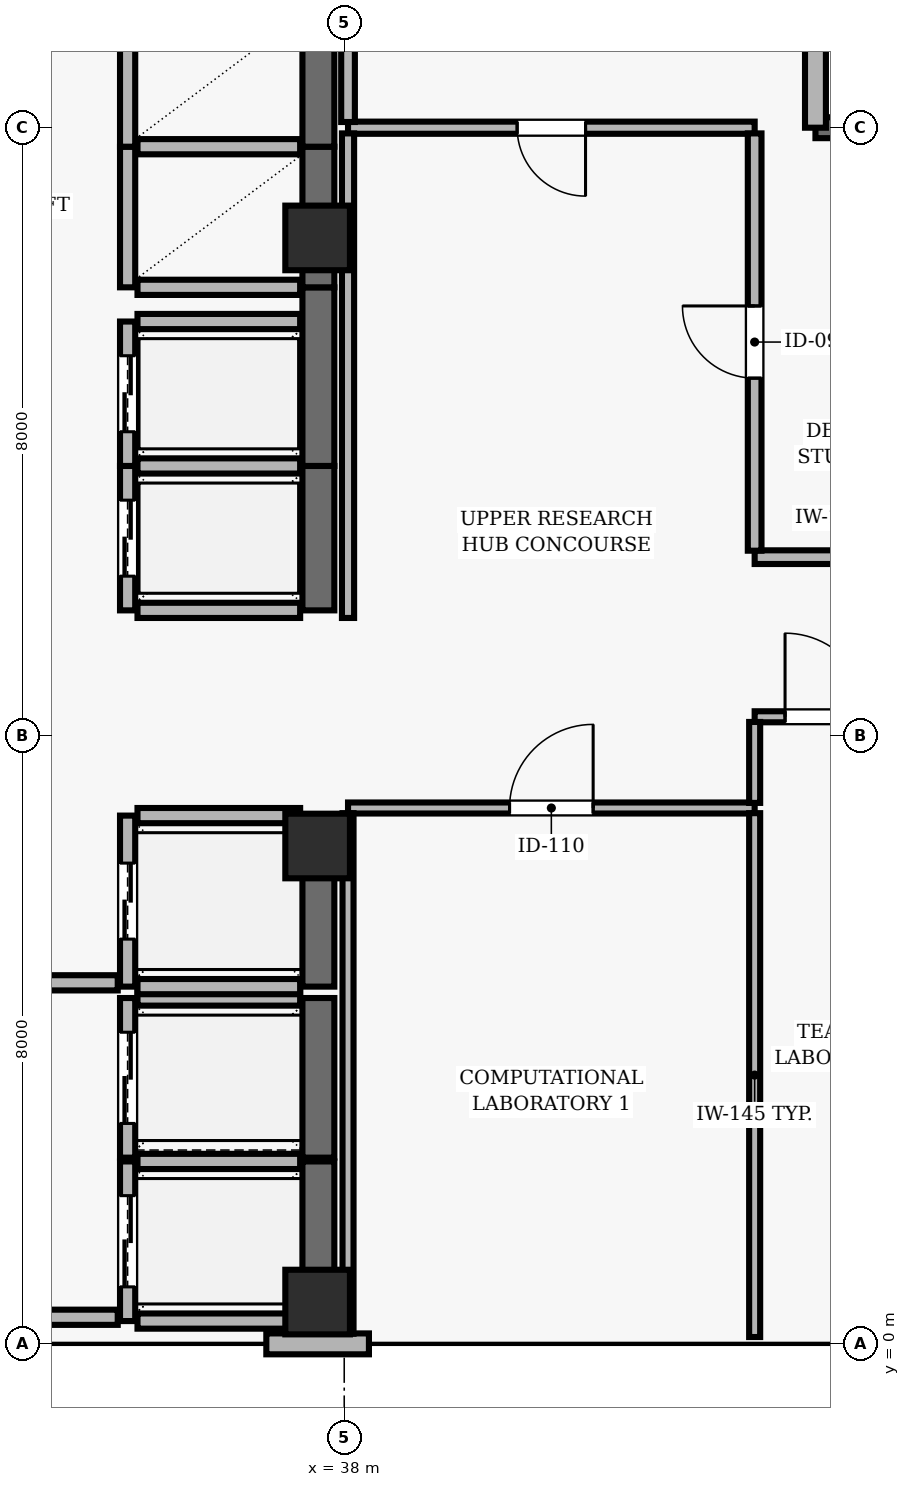
"""IFC4 building model, lengths in metres.
Left out: names, types, materials, properties, quantities, classifications, styles, units other than length and angle.
Written with IfcOpenShell. Run it as: python <this file> out.ifc"""

import sys

from ifc_helpers import new_model, si_unit, direction, frame, frame_2d, origin, origin_2d, place, context, subcontext, project, spatial, rectangle, extrude, element, fill, save


model = new_model("IFC4")
c1 = context("Model", 3, precision=1e-05, world=origin(), true_north=direction((0.0, 1.0)))
c2 = subcontext(c1, "Body", "Model", "MODEL_VIEW")
j1 = project(units=[si_unit("LENGTHUNIT", "METRE"), si_unit("PLANEANGLEUNIT", "RADIAN")], contexts=[c1])
p1 = place(None, origin())
s1 = spatial("IfcSite", under=j1, at=p1, CompositionType="ELEMENT")
p2 = place(p1, origin())
s2 = spatial("IfcBuilding", under=s1, at=p2, CompositionType="ELEMENT")
p3 = place(p2, frame((0.0, 0.0, 279.4)))
s3 = spatial("IfcBuildingStorey", under=s2, at=p3, CompositionType="ELEMENT", Elevation=279.4)
for number, where, z_axis, x_axis in (
    (1, (37.65, 0.55, 0.0), (0.0, 0.0, 1.0), (1.0, 0.0, 0.0)),
    (2, (37.65, 6.55, 0.0), (0.0, 0.0, 1.0), (1.0, 0.0, 0.0)),
    (3, (37.65, 14.55, 0.0), (0.0, 0.0, 1.0), (1.0, 0.0, 0.0)),
):
    element("IfcColumn", number, at=place(p3, frame(where, z_axis=z_axis, x_axis=x_axis)), inside=s3, PredefinedType="COLUMN", context=c2, shape_type="SweptSolid", body=[
        extrude(rectangle(XDim=0.85, YDim=0.85, at=origin_2d()), origin(), (0.0, 0.0, 1.0), 3.9),
    ])
p4 = place(p3, frame((36.975, 0.0, 0.0), z_axis=(0.0, 0.0, 1.0), x_axis=(1.0, 0.0, 0.0)))
e4 = element("IfcWall", 4, at=p4, inside=s3, PredefinedType="SOLIDWALL", context=c2, shape_type="SweptSolid", body=[
    extrude(rectangle(XDim=1.35, YDim=0.275, at=frame_2d((0.675, 0.0))), origin(), (0.0, 0.0, 1.0), 3.69),
])
p5 = place(p3, frame((57.3, 16.0, 0.0), z_axis=(0.0, 0.0, 1.0), x_axis=(-1.0, 0.0, 0.0)))
e5 = element("IfcWall", 5, at=p5, inside=s3, PredefinedType="SOLIDWALL", context=c2, shape_type="SweptSolid", body=[
    extrude(rectangle(XDim=13.1, YDim=0.275, at=frame_2d((6.55, 0.0))), origin(), (0.0, 0.0, 1.0), 3.69),
])
p6 = place(p5, frame((8.15, 0.0, 0.0)))
e6 = element("IfcOpeningElement", 6, at=p6, cuts=e5, PredefinedType="OPENING", context=c2, shape_type="SweptSolid", body=[
    extrude(rectangle(XDim=1.0, YDim=2.2, at=frame_2d((0.5, 1.1))), frame((0.0, 0.147, 0.0), z_axis=(0.0, -1.0, 0.0), x_axis=(1.0, 0.0, 0.0)), (0.0, 0.0, 1.0), 0.295),
])
p7 = place(p5, frame((1.775, 0.0, 0.9)))
e7 = element("IfcOpeningElement", 7, at=p7, cuts=e5, PredefinedType="OPENING", context=c2, shape_type="SweptSolid", body=[
    extrude(rectangle(XDim=1.2, YDim=1.6, at=frame_2d((0.6, 0.8))), frame((0.0, 0.147, 0.0), z_axis=(0.0, -1.0, 0.0), x_axis=(1.0, 0.0, 0.0)), (0.0, 0.0, 1.0), 0.295),
])
p8 = place(p3, frame((44.2, 16.0, 0.0), z_axis=(0.0, 0.0, 1.0), x_axis=(0.0, 1.0, 0.0)))
e8 = element("IfcWall", 8, at=p8, inside=s3, PredefinedType="SOLIDWALL", context=c2, shape_type="SweptSolid", body=[
    extrude(rectangle(XDim=4.4, YDim=0.275, at=frame_2d((2.2, 0.0))), origin(), (0.0, 0.0, 1.0), 3.69),
])
p9 = place(p3, frame((35.15, 2.4, 0.0), z_axis=(0.0, 0.0, 1.0), x_axis=(0.0, -1.0, 0.0)))
e9 = element("IfcWall", 9, at=p9, inside=s3, PredefinedType="SOLIDWALL", context=c2, shape_type="SweptSolid", body=[
    extrude(rectangle(XDim=2.1, YDim=0.2, at=frame_2d((1.05, 0.0))), origin(), (0.0, 0.0, 1.0), 3.69),
])
p10 = place(p9, frame((0.45, 0.0, 0.0)))
e10 = element("IfcOpeningElement", 10, at=p10, cuts=e9, PredefinedType="OPENING", context=c2, shape_type="SweptSolid", body=[
    extrude(rectangle(XDim=1.2, YDim=2.15, at=frame_2d((0.6, 1.075))), frame((0.0, 0.11, 0.0), z_axis=(0.0, -1.0, 0.0), x_axis=(1.0, 0.0, 0.0)), (0.0, 0.0, 1.0), 0.22),
])
p11 = place(p3, frame((37.66, 0.3, 0.0), z_axis=(0.0, 0.0, 1.0), x_axis=(0.0, 1.0, 0.0)))
e11 = element("IfcWall", 11, at=p11, inside=s3, PredefinedType="SHEAR", context=c2, shape_type="SweptSolid", body=[
    extrude(rectangle(XDim=2.1, YDim=0.42, at=frame_2d((1.05, 0.0))), origin(), (0.0, 0.0, 1.0), 3.69),
])
for number, where, z_axis, x_axis in (
    (12, (35.28, 0.3, 0.0), (0.0, 0.0, 1.0), (1.0, 0.0, 0.0)),
    (13, (37.42, 2.4, 0.0), (0.0, 0.0, 1.0), (-1.0, 0.0, 0.0)),
):
    element("IfcWall", number, at=place(p3, frame(where, z_axis=z_axis, x_axis=x_axis)), inside=s3, PredefinedType="SOLIDWALL", context=c2, shape_type="SweptSolid", body=[
        extrude(rectangle(XDim=2.14, YDim=0.2, at=frame_2d((1.07, 0.0))), origin(), (0.0, 0.0, 1.0), 3.69),
    ])
p12 = place(p3, frame((35.15, 4.55, 0.0), z_axis=(0.0, 0.0, 1.0), x_axis=(0.0, -1.0, 0.0)))
e14 = element("IfcWall", 14, at=p12, inside=s3, PredefinedType="SOLIDWALL", context=c2, shape_type="SweptSolid", body=[
    extrude(rectangle(XDim=2.1, YDim=0.2, at=frame_2d((1.05, 0.0))), origin(), (0.0, 0.0, 1.0), 3.69),
])
p13 = place(p12, frame((0.45, 0.0, 0.0)))
e15 = element("IfcOpeningElement", 15, at=p13, cuts=e14, PredefinedType="OPENING", context=c2, shape_type="SweptSolid", body=[
    extrude(rectangle(XDim=1.2, YDim=2.15, at=frame_2d((0.6, 1.075))), frame((0.0, 0.11, 0.0), z_axis=(0.0, -1.0, 0.0), x_axis=(1.0, 0.0, 0.0)), (0.0, 0.0, 1.0), 0.22),
])
p14 = place(p3, frame((37.66, 2.45, 0.0), z_axis=(0.0, 0.0, 1.0), x_axis=(0.0, 1.0, 0.0)))
e16 = element("IfcWall", 16, at=p14, inside=s3, PredefinedType="SHEAR", context=c2, shape_type="SweptSolid", body=[
    extrude(rectangle(XDim=2.1, YDim=0.42, at=frame_2d((1.05, 0.0))), origin(), (0.0, 0.0, 1.0), 3.69),
])
p15 = place(p3, frame((37.42, 4.55, 0.0), z_axis=(0.0, 0.0, 1.0), x_axis=(-1.0, 0.0, 0.0)))
e17 = element("IfcWall", 17, at=p15, inside=s3, PredefinedType="SOLIDWALL", context=c2, shape_type="SweptSolid", body=[
    extrude(rectangle(XDim=2.14, YDim=0.2, at=frame_2d((1.07, 0.0))), origin(), (0.0, 0.0, 1.0), 3.69),
])
p16 = place(p3, frame((35.15, 6.95, 0.0), z_axis=(0.0, 0.0, 1.0), x_axis=(0.0, -1.0, 0.0)))
e18 = element("IfcWall", 18, at=p16, inside=s3, PredefinedType="SOLIDWALL", context=c2, shape_type="SweptSolid", body=[
    extrude(rectangle(XDim=2.25, YDim=0.2, at=frame_2d((1.125, 0.0))), origin(), (0.0, 0.0, 1.0), 3.69),
])
p17 = place(p16, frame((0.625, 0.0, 0.0)))
e19 = element("IfcOpeningElement", 19, at=p17, cuts=e18, PredefinedType="OPENING", context=c2, shape_type="SweptSolid", body=[
    extrude(rectangle(XDim=1.0, YDim=2.1, at=frame_2d((0.5, 1.05))), frame((0.0, 0.11, 0.0), z_axis=(0.0, -1.0, 0.0), x_axis=(1.0, 0.0, 0.0)), (0.0, 0.0, 1.0), 0.22),
])
p18 = place(p3, frame((37.66, 4.7, 0.0), z_axis=(0.0, 0.0, 1.0), x_axis=(0.0, 1.0, 0.0)))
e20 = element("IfcWall", 20, at=p18, inside=s3, PredefinedType="SHEAR", context=c2, shape_type="SweptSolid", body=[
    extrude(rectangle(XDim=2.25, YDim=0.42, at=frame_2d((1.125, 0.0))), origin(), (0.0, 0.0, 1.0), 3.69),
])
for number, where, z_axis, x_axis in (
    (21, (35.28, 4.7, 0.0), (0.0, 0.0, 1.0), (1.0, 0.0, 0.0)),
    (22, (37.42, 6.95, 0.0), (0.0, 0.0, 1.0), (-1.0, 0.0, 0.0)),
):
    element("IfcWall", number, at=place(p3, frame(where, z_axis=z_axis, x_axis=x_axis)), inside=s3, PredefinedType="SOLIDWALL", context=c2, shape_type="SweptSolid", body=[
        extrude(rectangle(XDim=2.14, YDim=0.2, at=frame_2d((1.07, 0.0))), origin(), (0.0, 0.0, 1.0), 3.69),
    ])
p19 = place(p3, frame((35.15, 11.55, 0.0), z_axis=(0.0, 0.0, 1.0), x_axis=(0.0, -1.0, 0.0)))
e23 = element("IfcWall", 23, at=p19, inside=s3, PredefinedType="SOLIDWALL", context=c2, shape_type="SweptSolid", body=[
    extrude(rectangle(XDim=1.9, YDim=0.2, at=frame_2d((0.95, 0.0))), origin(), (0.0, 0.0, 1.0), 3.69),
])
p20 = place(p19, frame((0.45, 0.0, 0.0)))
e24 = element("IfcOpeningElement", 24, at=p20, cuts=e23, PredefinedType="OPENING", context=c2, shape_type="SweptSolid", body=[
    extrude(rectangle(XDim=1.0, YDim=2.1, at=frame_2d((0.5, 1.05))), frame((0.0, 0.11, 0.0), z_axis=(0.0, -1.0, 0.0), x_axis=(1.0, 0.0, 0.0)), (0.0, 0.0, 1.0), 0.22),
])
p21 = place(p3, frame((37.66, 9.65, 0.0), z_axis=(0.0, 0.0, 1.0), x_axis=(0.0, 1.0, 0.0)))
e25 = element("IfcWall", 25, at=p21, inside=s3, PredefinedType="SHEAR", context=c2, shape_type="SweptSolid", body=[
    extrude(rectangle(XDim=1.9, YDim=0.42, at=frame_2d((0.95, 0.0))), origin(), (0.0, 0.0, 1.0), 3.69),
])
for number, where, z_axis, x_axis in (
    (26, (35.28, 9.65, 0.0), (0.0, 0.0, 1.0), (1.0, 0.0, 0.0)),
    (27, (37.42, 11.55, 0.0), (0.0, 0.0, 1.0), (-1.0, 0.0, 0.0)),
):
    element("IfcWall", number, at=place(p3, frame(where, z_axis=z_axis, x_axis=x_axis)), inside=s3, PredefinedType="SOLIDWALL", context=c2, shape_type="SweptSolid", body=[
        extrude(rectangle(XDim=2.14, YDim=0.2, at=frame_2d((1.07, 0.0))), origin(), (0.0, 0.0, 1.0), 3.69),
    ])
p22 = place(p3, frame((35.15, 13.45, 0.0), z_axis=(0.0, 0.0, 1.0), x_axis=(0.0, -1.0, 0.0)))
e28 = element("IfcWall", 28, at=p22, inside=s3, PredefinedType="SOLIDWALL", context=c2, shape_type="SweptSolid", body=[
    extrude(rectangle(XDim=1.9, YDim=0.2, at=frame_2d((0.95, 0.0))), origin(), (0.0, 0.0, 1.0), 3.69),
])
p23 = place(p22, frame((0.45, 0.0, 0.0)))
e29 = element("IfcOpeningElement", 29, at=p23, cuts=e28, PredefinedType="OPENING", context=c2, shape_type="SweptSolid", body=[
    extrude(rectangle(XDim=1.0, YDim=2.1, at=frame_2d((0.5, 1.05))), frame((0.0, 0.11, 0.0), z_axis=(0.0, -1.0, 0.0), x_axis=(1.0, 0.0, 0.0)), (0.0, 0.0, 1.0), 0.22),
])
p24 = place(p3, frame((37.66, 11.55, 0.0), z_axis=(0.0, 0.0, 1.0), x_axis=(0.0, 1.0, 0.0)))
e30 = element("IfcWall", 30, at=p24, inside=s3, PredefinedType="SHEAR", context=c2, shape_type="SweptSolid", body=[
    extrude(rectangle(XDim=2.35, YDim=0.42, at=frame_2d((1.175, 0.0))), origin(), (0.0, 0.0, 1.0), 3.69),
])
p25 = place(p3, frame((37.42, 13.45, 0.0), z_axis=(0.0, 0.0, 1.0), x_axis=(-1.0, 0.0, 0.0)))
e31 = element("IfcWall", 31, at=p25, inside=s3, PredefinedType="SOLIDWALL", context=c2, shape_type="SweptSolid", body=[
    extrude(rectangle(XDim=2.14, YDim=0.2, at=frame_2d((1.07, 0.0))), origin(), (0.0, 0.0, 1.0), 3.69),
])
p26 = place(p3, frame((35.15, 15.75, 0.0), z_axis=(0.0, 0.0, 1.0), x_axis=(0.0, -1.0, 0.0)))
e32 = element("IfcWall", 32, at=p26, inside=s3, PredefinedType="SOLIDWALL", context=c2, shape_type="SweptSolid", body=[
    extrude(rectangle(XDim=1.85, YDim=0.2, at=frame_2d((0.925, 0.0))), origin(), (0.0, 0.0, 1.0), 3.69),
])
p27 = place(p3, frame((37.66, 13.9, 0.0), z_axis=(0.0, 0.0, 1.0), x_axis=(0.0, 1.0, 0.0)))
e33 = element("IfcWall", 33, at=p27, inside=s3, PredefinedType="SHEAR", context=c2, shape_type="SweptSolid", body=[
    extrude(rectangle(XDim=1.85, YDim=0.42, at=frame_2d((0.925, 0.0))), origin(), (0.0, 0.0, 1.0), 3.69),
])
for number, where, z_axis, x_axis in (
    (34, (35.28, 13.9, 0.0), (0.0, 0.0, 1.0), (1.0, 0.0, 0.0)),
    (35, (37.42, 15.75, 0.0), (0.0, 0.0, 1.0), (-1.0, 0.0, 0.0)),
):
    element("IfcWall", number, at=place(p3, frame(where, z_axis=z_axis, x_axis=x_axis)), inside=s3, PredefinedType="SOLIDWALL", context=c2, shape_type="SweptSolid", body=[
        extrude(rectangle(XDim=2.14, YDim=0.2, at=frame_2d((1.07, 0.0))), origin(), (0.0, 0.0, 1.0), 3.69),
    ])
p28 = place(p3, frame((35.15, 17.6, 0.0), z_axis=(0.0, 0.0, 1.0), x_axis=(0.0, -1.0, 0.0)))
e36 = element("IfcWall", 36, at=p28, inside=s3, PredefinedType="SOLIDWALL", context=c2, shape_type="SweptSolid", body=[
    extrude(rectangle(XDim=1.85, YDim=0.2, at=frame_2d((0.925, 0.0))), origin(), (0.0, 0.0, 1.0), 3.69),
])
p29 = place(p3, frame((37.66, 15.75, 0.0), z_axis=(0.0, 0.0, 1.0), x_axis=(0.0, 1.0, 0.0)))
e37 = element("IfcWall", 37, at=p29, inside=s3, PredefinedType="SHEAR", context=c2, shape_type="SweptSolid", body=[
    extrude(rectangle(XDim=1.85, YDim=0.42, at=frame_2d((0.925, 0.0))), origin(), (0.0, 0.0, 1.0), 3.69),
])
p30 = place(p3, frame((31.65, 0.35, 0.0), z_axis=(0.0, 0.0, 1.0), x_axis=(1.0, 0.0, 0.0)))
e38 = element("IfcWall", 38, at=p30, inside=s3, PredefinedType="SOLIDWALL", context=c2, shape_type="SweptSolid", body=[
    extrude(rectangle(XDim=3.37, YDim=0.2, at=frame_2d((1.685, 0.0))), origin(), (0.0, 0.0, 1.0), 3.69),
])
p31 = place(p3, frame((35.02, 4.75, 0.0), z_axis=(0.0, 0.0, 1.0), x_axis=(-1.0, 0.0, 0.0)))
e39 = element("IfcWall", 39, at=p31, inside=s3, PredefinedType="SOLIDWALL", context=c2, shape_type="SweptSolid", body=[
    extrude(rectangle(XDim=3.11, YDim=0.2, at=frame_2d((1.555, 0.0))), origin(), (0.0, 0.0, 1.0), 3.69),
])
p32 = place(p31, frame((1.03, 0.0, 0.0)))
e40 = element("IfcOpeningElement", 40, at=p32, cuts=e39, PredefinedType="OPENING", context=c2, shape_type="SweptSolid", body=[
    extrude(rectangle(XDim=1.05, YDim=2.15, at=frame_2d((0.525, 1.075))), frame((0.0, 0.11, 0.0), z_axis=(0.0, -1.0, 0.0), x_axis=(1.0, 0.0, 0.0)), (0.0, 0.0, 1.0), 0.22),
])
p33 = place(p3, frame((38.05, 7.05, 0.0), z_axis=(0.0, 0.0, 1.0), x_axis=(1.0, 0.0, 0.0)))
e41 = element("IfcWall", 41, at=p33, inside=s3, PredefinedType="PARTITIONING", context=c2, shape_type="SweptSolid", body=[
    extrude(rectangle(XDim=5.35, YDim=0.145, at=frame_2d((2.675, 0.0))), origin(), (0.0, 0.0, 1.0), 3.69),
])
p34 = place(p33, frame((2.125, 0.0, 0.0)))
e42 = element("IfcOpeningElement", 42, at=p34, cuts=e41, PredefinedType="OPENING", context=c2, shape_type="SweptSolid", body=[
    extrude(rectangle(XDim=1.1, YDim=2.15, at=frame_2d((0.55, 1.075))), frame((0.0, 0.083, 0.0), z_axis=(0.0, -1.0, 0.0), x_axis=(1.0, 0.0, 0.0)), (0.0, 0.0, 1.0), 0.165),
])
p35 = place(p3, frame((43.4, 8.25, 0.0), z_axis=(0.0, 0.0, 1.0), x_axis=(1.0, 0.0, 0.0)))
e43 = element("IfcWall", 43, at=p35, inside=s3, PredefinedType="PARTITIONING", context=c2, shape_type="SweptSolid", body=[
    extrude(rectangle(XDim=2.6, YDim=0.145, at=frame_2d((1.3, 0.0))), origin(), (0.0, 0.0, 1.0), 3.221),
])
p36 = place(p35, frame((0.4, 0.0, 0.0)))
e44 = element("IfcOpeningElement", 44, at=p36, cuts=e43, PredefinedType="OPENING", context=c2, shape_type="SweptSolid", body=[
    extrude(rectangle(XDim=1.1, YDim=2.15, at=frame_2d((0.55, 1.075))), frame((0.0, 0.083, 0.0), z_axis=(0.0, -1.0, 0.0), x_axis=(1.0, 0.0, 0.0)), (0.0, 0.0, 1.0), 0.165),
])
p37 = place(p3, frame((43.4, 16.0, 0.0), z_axis=(0.0, 0.0, 1.0), x_axis=(-1.0, 0.0, 0.0)))
e45 = element("IfcWall", 45, at=p37, inside=s3, PredefinedType="PARTITIONING", context=c2, shape_type="SweptSolid", body=[
    extrude(rectangle(XDim=5.35, YDim=0.16, at=frame_2d((2.675, 0.0))), origin(), (0.0, 0.0, 1.0), 3.39),
])
p38 = place(p37, frame((2.225, 0.0, 0.0)))
e46 = element("IfcOpeningElement", 46, at=p38, cuts=e45, PredefinedType="OPENING", context=c2, shape_type="SweptSolid", body=[
    extrude(rectangle(XDim=0.9, YDim=2.1, at=frame_2d((0.45, 1.05))), frame((0.0, 0.09, 0.0), z_axis=(0.0, -1.0, 0.0), x_axis=(1.0, 0.0, 0.0)), (0.0, 0.0, 1.0), 0.18),
])
p39 = place(p3, frame((46.0, 10.35, 0.0), z_axis=(0.0, 0.0, 1.0), x_axis=(-1.0, 0.0, 0.0)))
e47 = element("IfcWall", 47, at=p39, inside=s3, PredefinedType="PARTITIONING", context=c2, shape_type="SweptSolid", body=[
    extrude(rectangle(XDim=2.6, YDim=0.18, at=frame_2d((1.3, 0.0))), origin(), (0.0, 0.0, 1.0), 3.372),
])
p40 = place(p3, frame((38.05, 6.982, 0.0), z_axis=(0.0, 0.0, 1.0), x_axis=(0.0, -1.0, 0.0)))
e48 = element("IfcWall", 48, at=p40, inside=s3, PredefinedType="PARTITIONING", context=c2, shape_type="SweptSolid", body=[
    extrude(rectangle(XDim=6.849, YDim=0.145, at=frame_2d((3.424, 0.0))), origin(), (0.0, 0.0, 1.0), 3.221),
])
p41 = place(p3, frame((38.05, 15.925, 0.0), z_axis=(0.0, 0.0, 1.0), x_axis=(0.0, -1.0, 0.0)))
e49 = element("IfcWall", 49, at=p41, inside=s3, PredefinedType="PARTITIONING", context=c2, shape_type="SweptSolid", body=[
    extrude(rectangle(XDim=6.375, YDim=0.16, at=frame_2d((3.188, 0.0))), origin(), (0.0, 0.0, 1.0), 3.221),
])
p42 = place(p3, frame((38.05, 21.468, 0.0), z_axis=(0.0, 0.0, 1.0), x_axis=(0.0, -1.0, 0.0)))
e50 = element("IfcWall", 50, at=p42, inside=s3, PredefinedType="PARTITIONING", context=c2, shape_type="SweptSolid", body=[
    extrude(rectangle(XDim=5.393, YDim=0.18, at=frame_2d((2.697, 0.0))), origin(), (0.0, 0.0, 1.0), 3.221),
])
p43 = place(p3, frame((43.4, 0.09, 0.0), z_axis=(0.0, 0.0, 1.0), x_axis=(0.0, 1.0, 0.0)))
e51 = element("IfcWall", 51, at=p43, inside=s3, PredefinedType="PARTITIONING", context=c2, shape_type="SweptSolid", body=[
    extrude(rectangle(XDim=6.892, YDim=0.145, at=frame_2d((3.446, 0.0))), origin(), (0.0, 0.0, 1.0), 3.69),
])
p44 = place(p3, frame((43.4, 7.117, 0.0), z_axis=(0.0, 0.0, 1.0), x_axis=(0.0, 1.0, 0.0)))
e52 = element("IfcWall", 52, at=p44, inside=s3, PredefinedType="PARTITIONING", context=c2, shape_type="SweptSolid", body=[
    extrude(rectangle(XDim=1.065, YDim=0.145, at=frame_2d((0.532, 0.0))), origin(), (0.0, 0.0, 1.0), 3.69),
])
p45 = place(p3, frame((43.4, 10.435, 0.0), z_axis=(0.0, 0.0, 1.0), x_axis=(0.0, 1.0, 0.0)))
e53 = element("IfcWall", 53, at=p45, inside=s3, PredefinedType="PARTITIONING", context=c2, shape_type="SweptSolid", body=[
    extrude(rectangle(XDim=5.49, YDim=0.18, at=frame_2d((2.745, 0.0))), origin(), (0.0, 0.0, 1.0), 3.69),
])
p46 = place(p45, frame((2.27, 0.0, 0.0)))
e54 = element("IfcOpeningElement", 54, at=p46, cuts=e53, PredefinedType="OPENING", context=c2, shape_type="SweptSolid", body=[
    extrude(rectangle(XDim=0.95, YDim=2.1, at=frame_2d((0.475, 1.05))), frame((0.0, 0.1, 0.0), z_axis=(0.0, -1.0, 0.0), x_axis=(1.0, 0.0, 0.0)), (0.0, 0.0, 1.0), 0.2),
])
p47 = place(p10, origin())
e55 = element("IfcDoor", 55, at=p47, inside=s3, OperationType="DOUBLE_DOOR_SLIDING", PredefinedType="DOOR", context=c2, shape_type="SweptSolid", body=[
    extrude(rectangle(XDim=1.2, YDim=2.15, at=frame_2d((0.6, 1.075))), frame((0.0, 0.025, 0.0), z_axis=(0.0, -1.0, 0.0), x_axis=(1.0, 0.0, 0.0)), (0.0, 0.0, 1.0), 0.05),
])
fill(e10, e55)
p48 = place(p13, origin())
e56 = element("IfcDoor", 56, at=p48, inside=s3, OperationType="DOUBLE_DOOR_SLIDING", PredefinedType="DOOR", context=c2, shape_type="SweptSolid", body=[
    extrude(rectangle(XDim=1.2, YDim=2.15, at=frame_2d((0.6, 1.075))), frame((0.0, 0.025, 0.0), z_axis=(0.0, -1.0, 0.0), x_axis=(1.0, 0.0, 0.0)), (0.0, 0.0, 1.0), 0.05),
])
fill(e15, e56)
p49 = place(p17, origin())
e57 = element("IfcDoor", 57, at=p49, inside=s3, OperationType="DOUBLE_DOOR_SLIDING", PredefinedType="DOOR", context=c2, shape_type="SweptSolid", body=[
    extrude(rectangle(XDim=1.0, YDim=2.1, at=frame_2d((0.5, 1.05))), frame((0.0, 0.025, 0.0), z_axis=(0.0, -1.0, 0.0), x_axis=(1.0, 0.0, 0.0)), (0.0, 0.0, 1.0), 0.05),
])
fill(e19, e57)
p50 = place(p20, origin())
e58 = element("IfcDoor", 58, at=p50, inside=s3, OperationType="DOUBLE_DOOR_SLIDING", PredefinedType="DOOR", context=c2, shape_type="SweptSolid", body=[
    extrude(rectangle(XDim=1.0, YDim=2.1, at=frame_2d((0.5, 1.05))), frame((0.0, 0.025, 0.0), z_axis=(0.0, -1.0, 0.0), x_axis=(1.0, 0.0, 0.0)), (0.0, 0.0, 1.0), 0.05),
])
fill(e24, e58)
p51 = place(p23, origin())
e59 = element("IfcDoor", 59, at=p51, inside=s3, OperationType="DOUBLE_DOOR_SLIDING", PredefinedType="DOOR", context=c2, shape_type="SweptSolid", body=[
    extrude(rectangle(XDim=1.0, YDim=2.1, at=frame_2d((0.5, 1.05))), frame((0.0, 0.025, 0.0), z_axis=(0.0, -1.0, 0.0), x_axis=(1.0, 0.0, 0.0)), (0.0, 0.0, 1.0), 0.05),
])
fill(e29, e59)
p52 = place(p34, origin())
e60 = element("IfcDoor", 60, at=p52, inside=s3, OperationType="SINGLE_SWING_RIGHT", PredefinedType="DOOR", context=c2, shape_type="SweptSolid", body=[
    extrude(rectangle(XDim=1.1, YDim=2.15, at=frame_2d((0.55, 1.075))), frame((0.0, 0.025, 0.0), z_axis=(0.0, -1.0, 0.0), x_axis=(1.0, 0.0, 0.0)), (0.0, 0.0, 1.0), 0.05),
])
fill(e42, e60)
p53 = place(p36, origin())
e61 = element("IfcDoor", 61, at=p53, inside=s3, OperationType="SINGLE_SWING_LEFT", PredefinedType="DOOR", context=c2, shape_type="SweptSolid", body=[
    extrude(rectangle(XDim=1.1, YDim=2.15, at=frame_2d((0.55, 1.075))), frame((0.0, 0.025, 0.0), z_axis=(0.0, -1.0, 0.0), x_axis=(1.0, 0.0, 0.0)), (0.0, 0.0, 1.0), 0.05),
])
fill(e44, e61)
p54 = place(p46, origin())
e62 = element("IfcDoor", 62, at=p54, inside=s3, OperationType="SINGLE_SWING_RIGHT", PredefinedType="DOOR", context=c2, shape_type="SweptSolid", body=[
    extrude(rectangle(XDim=0.95, YDim=2.1, at=frame_2d((0.475, 1.05))), frame((0.0, 0.025, 0.0), z_axis=(0.0, -1.0, 0.0), x_axis=(1.0, 0.0, 0.0)), (0.0, 0.0, 1.0), 0.05),
])
fill(e54, e62)
p55 = place(p38, origin())
e63 = element("IfcDoor", 63, at=p55, inside=s3, OperationType="SINGLE_SWING_LEFT", PredefinedType="DOOR", context=c2, shape_type="SweptSolid", body=[
    extrude(rectangle(XDim=0.9, YDim=2.1, at=frame_2d((0.45, 1.05))), frame((0.0, 0.025, 0.0), z_axis=(0.0, -1.0, 0.0), x_axis=(1.0, 0.0, 0.0)), (0.0, 0.0, 1.0), 0.05),
])
fill(e46, e63)
save(model, sys.argv[1])
